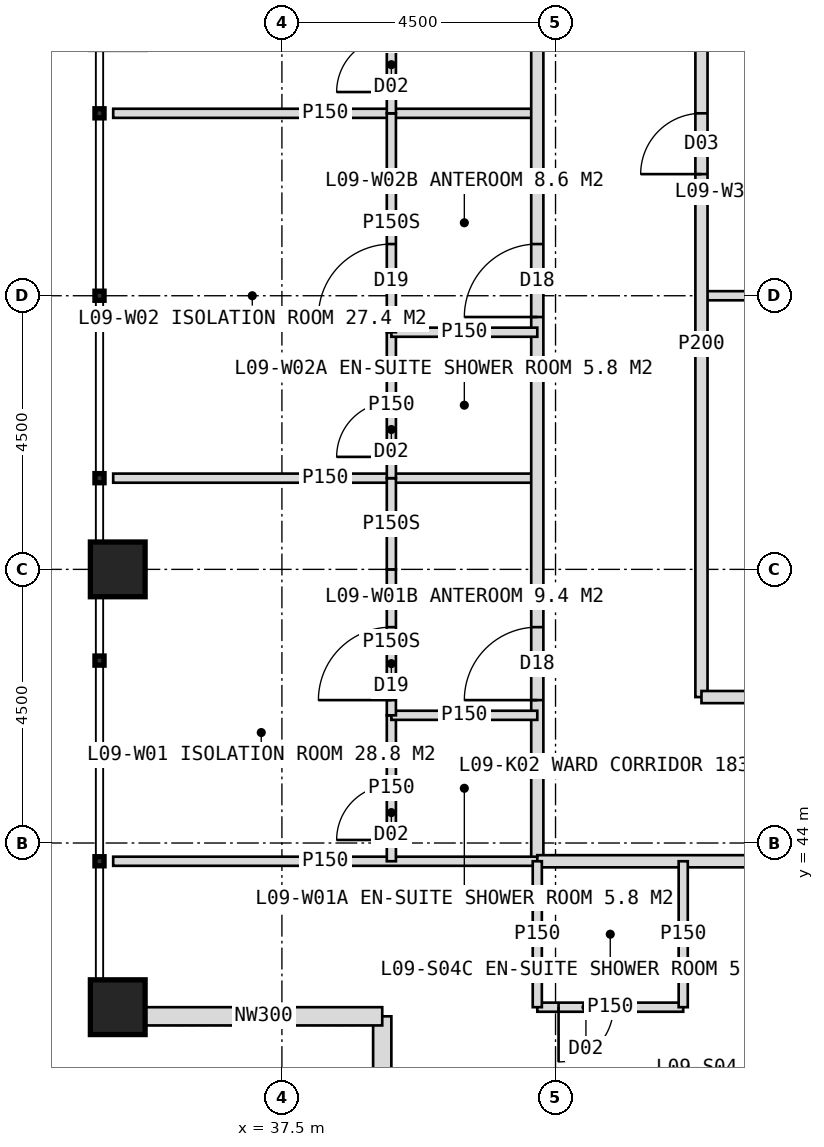
"""IFC4 building model, lengths in metres.
Left out: names, types, materials, properties, quantities, classifications, styles, units other than length and angle.
Written with IfcOpenShell. Run it as: python <this file> out.ifc"""

import sys

from ifc_helpers import new_model, si_unit, direction, frame, frame_2d, origin, origin_2d, place, context, subcontext, project, spatial, rectangle, hollow_rectangle, extrude, element, fill, save


model = new_model("IFC4")
c1 = context("Model", 3, precision=1e-05, world=origin(), true_north=direction((0.0, 1.0)))
c2 = subcontext(c1, "Body", "Model", "MODEL_VIEW")
j1 = project(units=[si_unit("LENGTHUNIT", "METRE"), si_unit("PLANEANGLEUNIT", "RADIAN")], contexts=[c1])
p1 = place(None, origin())
s1 = spatial("IfcSite", under=j1, at=p1, CompositionType="ELEMENT")
p2 = place(p1, origin())
s2 = spatial("IfcBuilding", under=s1, at=p2, CompositionType="ELEMENT")
p3 = place(p2, frame((0.0, 0.0, 43.0)))
s3 = spatial("IfcBuildingStorey", under=s2, at=p3, CompositionType="ELEMENT", Elevation=43.0)
for number, where, z_axis, x_axis in (
    (1, (34.8, 41.3, 0.0), (0.0, 0.0, 1.0), (1.0, 0.0, 0.0)),
    (2, (34.8, 48.5, 0.0), (0.0, 0.0, 1.0), (1.0, 0.0, 0.0)),
):
    element("IfcColumn", number, at=place(p3, frame(where, z_axis=z_axis, x_axis=x_axis)), inside=s3, PredefinedType="COLUMN", context=c2, shape_type="SweptSolid", body=[
        extrude(hollow_rectangle(XDim=0.9, YDim=0.9, WallThickness=0.08, at=origin_2d()), origin(), (0.0, 0.0, 1.0), 4.0),
    ])
for number, where, z_axis, x_axis in (
    (3, (39.15, 37.25, 0.0), (0.0, 0.0, 1.0), (0.0, 1.0, 0.0)),
    (4, (39.15, 41.15, 0.0), (0.0, 0.0, 1.0), (-1.0, 0.0, 0.0)),
):
    element("IfcWall", number, at=place(p3, frame(where, z_axis=z_axis, x_axis=x_axis)), inside=s3, PredefinedType="ELEMENTEDWALL", context=c2, shape_type="SweptSolid", body=[
        extrude(rectangle(XDim=3.9, YDim=0.3, at=frame_2d((1.95, 0.0))), origin(), (0.0, 0.0, 1.0), 2.95),
    ])
for number, where, z_axis, x_axis in (
    (5, (41.7, 50.0, 0.0), (0.0, 0.0, 1.0), (-1.0, 0.0, 0.0)),
    (6, (41.7, 56.0, 0.0), (0.0, 0.0, 1.0), (-1.0, 0.0, 0.0)),
):
    element("IfcWall", number, at=place(p3, frame(where, z_axis=z_axis, x_axis=x_axis)), inside=s3, PredefinedType="PARTITIONING", context=c2, shape_type="SweptSolid", body=[
        extrude(rectangle(XDim=6.975, YDim=0.15, at=frame_2d((3.487, 0.0))), origin(), (0.0, 0.0, 1.0), 3.75),
    ])
p4 = place(p3, frame((41.7, 43.7, 0.0), z_axis=(0.0, 0.0, 1.0), x_axis=(0.0, 1.0, 0.0)))
e7 = element("IfcWall", 7, at=p4, inside=s3, PredefinedType="PARTITIONING", context=c2, shape_type="SweptSolid", body=[
    extrude(rectangle(XDim=36.6, YDim=0.2, at=frame_2d((18.3, 0.0))), origin(), (0.0, 0.0, 1.0), 3.75),
])
p5 = place(p4, frame((2.65, 0.0, 0.0)))
e8 = element("IfcOpeningElement", 8, at=p5, cuts=e7, PredefinedType="OPENING", context=c2, shape_type="SweptSolid", body=[
    extrude(rectangle(XDim=1.2, YDim=2.2, at=frame_2d((0.6, 1.1))), frame((0.0, 0.11, 0.0), z_axis=(0.0, -1.0, 0.0), x_axis=(1.0, 0.0, 0.0)), (0.0, 0.0, 1.0), 0.22),
])
p6 = place(p4, frame((8.95, 0.0, 0.0)))
e9 = element("IfcOpeningElement", 9, at=p6, cuts=e7, PredefinedType="OPENING", context=c2, shape_type="SweptSolid", body=[
    extrude(rectangle(XDim=1.2, YDim=2.2, at=frame_2d((0.6, 1.1))), frame((0.0, 0.11, 0.0), z_axis=(0.0, -1.0, 0.0), x_axis=(1.0, 0.0, 0.0)), (0.0, 0.0, 1.0), 0.22),
])
p7 = place(p4, frame((14.95, 0.0, 0.0)))
e10 = element("IfcOpeningElement", 10, at=p7, cuts=e7, PredefinedType="OPENING", context=c2, shape_type="SweptSolid", body=[
    extrude(rectangle(XDim=1.2, YDim=2.2, at=frame_2d((0.6, 1.1))), frame((0.0, 0.11, 0.0), z_axis=(0.0, -1.0, 0.0), x_axis=(1.0, 0.0, 0.0)), (0.0, 0.0, 1.0), 0.22),
])
p8 = place(p4, frame((20.95, 0.0, 0.0)))
e11 = element("IfcOpeningElement", 11, at=p8, cuts=e7, PredefinedType="OPENING", context=c2, shape_type="SweptSolid", body=[
    extrude(rectangle(XDim=1.2, YDim=2.2, at=frame_2d((0.6, 1.1))), frame((0.0, 0.11, 0.0), z_axis=(0.0, -1.0, 0.0), x_axis=(1.0, 0.0, 0.0)), (0.0, 0.0, 1.0), 0.22),
])
p9 = place(p4, frame((29.95, 0.0, 0.0)))
e12 = element("IfcOpeningElement", 12, at=p9, cuts=e7, PredefinedType="OPENING", context=c2, shape_type="SweptSolid", body=[
    extrude(rectangle(XDim=1.2, YDim=2.2, at=frame_2d((0.6, 1.1))), frame((0.0, 0.11, 0.0), z_axis=(0.0, -1.0, 0.0), x_axis=(1.0, 0.0, 0.0)), (0.0, 0.0, 1.0), 0.22),
])
p10 = place(p3, frame((41.7, 43.7, 0.0), z_axis=(0.0, 0.0, 1.0), x_axis=(-1.0, 0.0, 0.0)))
e13 = element("IfcWall", 13, at=p10, inside=s3, PredefinedType="PARTITIONING", context=c2, shape_type="SweptSolid", body=[
    extrude(rectangle(XDim=6.975, YDim=0.15, at=frame_2d((3.487, 0.0))), origin(), (0.0, 0.0, 1.0), 3.75),
])
p11 = place(p3, frame((39.3, 43.7, 0.0), z_axis=(0.0, 0.0, 1.0), x_axis=(0.0, 1.0, 0.0)))
e14 = element("IfcWall", 14, at=p11, inside=s3, PredefinedType="PARTITIONING", context=c2, shape_type="SweptSolid", body=[
    extrude(rectangle(XDim=2.4, YDim=0.15, at=frame_2d((1.2, 0.0))), origin(), (0.0, 0.0, 1.0), 2.95),
])
p12 = place(p11, frame((0.35, 0.0, 0.0)))
e15 = element("IfcOpeningElement", 15, at=p12, cuts=e14, PredefinedType="OPENING", context=c2, shape_type="SweptSolid", body=[
    extrude(rectangle(XDim=0.9, YDim=2.1, at=frame_2d((0.45, 1.05))), frame((0.0, 0.085, 0.0), z_axis=(0.0, -1.0, 0.0), x_axis=(1.0, 0.0, 0.0)), (0.0, 0.0, 1.0), 0.17),
])
p13 = place(p3, frame((41.7, 46.1, 0.0), z_axis=(0.0, 0.0, 1.0), x_axis=(-1.0, 0.0, 0.0)))
e16 = element("IfcWall", 16, at=p13, inside=s3, PredefinedType="PARTITIONING", context=c2, shape_type="SweptSolid", body=[
    extrude(rectangle(XDim=2.4, YDim=0.15, at=frame_2d((1.2, 0.0))), origin(), (0.0, 0.0, 1.0), 3.75),
])
p14 = place(p3, frame((39.3, 46.1, 0.0), z_axis=(0.0, 0.0, 1.0), x_axis=(0.0, 1.0, 0.0)))
e17 = element("IfcWall", 17, at=p14, inside=s3, PredefinedType="PARTITIONING", context=c2, shape_type="SweptSolid", body=[
    extrude(rectangle(XDim=2.4, YDim=0.15, at=frame_2d((1.2, 0.0))), origin(), (0.0, 0.0, 1.0), 2.95),
])
p15 = place(p14, frame((0.25, 0.0, 0.0)))
e18 = element("IfcOpeningElement", 18, at=p15, cuts=e17, PredefinedType="OPENING", context=c2, shape_type="SweptSolid", body=[
    extrude(rectangle(XDim=1.2, YDim=2.2, at=frame_2d((0.6, 1.1))), frame((0.0, 0.085, 0.0), z_axis=(0.0, -1.0, 0.0), x_axis=(1.0, 0.0, 0.0)), (0.0, 0.0, 1.0), 0.17),
])
p16 = place(p3, frame((39.3, 48.5, 0.0), z_axis=(0.0, 0.0, 1.0), x_axis=(0.0, 1.0, 0.0)))
e19 = element("IfcWall", 19, at=p16, inside=s3, PredefinedType="PARTITIONING", context=c2, shape_type="SweptSolid", body=[
    extrude(rectangle(XDim=1.5, YDim=0.15, at=frame_2d((0.75, 0.0))), origin(), (0.0, 0.0, 1.0), 3.75),
])
p17 = place(p3, frame((39.3, 50.0, 0.0), z_axis=(0.0, 0.0, 1.0), x_axis=(0.0, 1.0, 0.0)))
e20 = element("IfcWall", 20, at=p17, inside=s3, PredefinedType="PARTITIONING", context=c2, shape_type="SweptSolid", body=[
    extrude(rectangle(XDim=2.4, YDim=0.15, at=frame_2d((1.2, 0.0))), origin(), (0.0, 0.0, 1.0), 3.75),
])
p18 = place(p17, frame((0.35, 0.0, 0.0)))
e21 = element("IfcOpeningElement", 21, at=p18, cuts=e20, PredefinedType="OPENING", context=c2, shape_type="SweptSolid", body=[
    extrude(rectangle(XDim=0.9, YDim=2.1, at=frame_2d((0.45, 1.05))), frame((0.0, 0.085, 0.0), z_axis=(0.0, -1.0, 0.0), x_axis=(1.0, 0.0, 0.0)), (0.0, 0.0, 1.0), 0.17),
])
p19 = place(p3, frame((41.7, 52.4, 0.0), z_axis=(0.0, 0.0, 1.0), x_axis=(-1.0, 0.0, 0.0)))
e22 = element("IfcWall", 22, at=p19, inside=s3, PredefinedType="PARTITIONING", context=c2, shape_type="SweptSolid", body=[
    extrude(rectangle(XDim=2.4, YDim=0.15, at=frame_2d((1.2, 0.0))), origin(), (0.0, 0.0, 1.0), 3.75),
])
p20 = place(p3, frame((39.3, 52.4, 0.0), z_axis=(0.0, 0.0, 1.0), x_axis=(0.0, 1.0, 0.0)))
e23 = element("IfcWall", 23, at=p20, inside=s3, PredefinedType="PARTITIONING", context=c2, shape_type="SweptSolid", body=[
    extrude(rectangle(XDim=3.6, YDim=0.15, at=frame_2d((1.8, 0.0))), origin(), (0.0, 0.0, 1.0), 3.75),
])
p21 = place(p20, frame((0.25, 0.0, 0.0)))
e24 = element("IfcOpeningElement", 24, at=p21, cuts=e23, PredefinedType="OPENING", context=c2, shape_type="SweptSolid", body=[
    extrude(rectangle(XDim=1.2, YDim=2.2, at=frame_2d((0.6, 1.1))), frame((0.0, 0.085, 0.0), z_axis=(0.0, -1.0, 0.0), x_axis=(1.0, 0.0, 0.0)), (0.0, 0.0, 1.0), 0.17),
])
p22 = place(p3, frame((39.3, 56.0, 0.0), z_axis=(0.0, 0.0, 1.0), x_axis=(0.0, 1.0, 0.0)))
e25 = element("IfcWall", 25, at=p22, inside=s3, PredefinedType="PARTITIONING", context=c2, shape_type="SweptSolid", body=[
    extrude(rectangle(XDim=2.4, YDim=0.15, at=frame_2d((1.2, 0.0))), origin(), (0.0, 0.0, 1.0), 3.75),
])
p23 = place(p22, frame((0.35, 0.0, 0.0)))
e26 = element("IfcOpeningElement", 26, at=p23, cuts=e25, PredefinedType="OPENING", context=c2, shape_type="SweptSolid", body=[
    extrude(rectangle(XDim=0.9, YDim=2.1, at=frame_2d((0.45, 1.05))), frame((0.0, 0.085, 0.0), z_axis=(0.0, -1.0, 0.0), x_axis=(1.0, 0.0, 0.0)), (0.0, 0.0, 1.0), 0.17),
])
p24 = place(p3, frame((51.0, 53.0, 0.0), z_axis=(0.0, 0.0, 1.0), x_axis=(-1.0, 0.0, 0.0)))
e27 = element("IfcWall", 27, at=p24, inside=s3, PredefinedType="PARTITIONING", context=c2, shape_type="SweptSolid", body=[
    extrude(rectangle(XDim=6.6, YDim=0.15, at=frame_2d((3.3, 0.0))), origin(), (0.0, 0.0, 1.0), 3.75),
])
p25 = place(p3, frame((44.4, 46.4, 0.0), z_axis=(0.0, 0.0, 1.0), x_axis=(0.0, 1.0, 0.0)))
e28 = element("IfcWall", 28, at=p25, inside=s3, PredefinedType="PARTITIONING", context=c2, shape_type="SweptSolid", body=[
    extrude(rectangle(XDim=11.6, YDim=0.2, at=frame_2d((5.8, 0.0))), origin(), (0.0, 0.0, 1.0), 3.75),
])
p26 = place(p25, frame((8.6, 0.0, 0.0)))
e29 = element("IfcOpeningElement", 29, at=p26, cuts=e28, PredefinedType="OPENING", context=c2, shape_type="SweptSolid", body=[
    extrude(rectangle(XDim=1.0, YDim=2.1, at=frame_2d((0.5, 1.05))), frame((0.0, 0.11, 0.0), z_axis=(0.0, -1.0, 0.0), x_axis=(1.0, 0.0, 0.0)), (0.0, 0.0, 1.0), 0.22),
])
p27 = place(p3, frame((78.3, 43.7, 0.0), z_axis=(0.0, 0.0, 1.0), x_axis=(-1.0, 0.0, 0.0)))
e30 = element("IfcWall", 30, at=p27, inside=s3, PredefinedType="PARTITIONING", context=c2, shape_type="SweptSolid", body=[
    extrude(rectangle(XDim=36.6, YDim=0.2, at=frame_2d((18.3, 0.0))), origin(), (0.0, 0.0, 1.0), 3.75),
])
p28 = place(p27, frame((2.65, 0.0, 0.0)))
e31 = element("IfcOpeningElement", 31, at=p28, cuts=e30, PredefinedType="OPENING", context=c2, shape_type="SweptSolid", body=[
    extrude(rectangle(XDim=1.2, YDim=2.2, at=frame_2d((0.6, 1.1))), frame((0.0, 0.11, 0.0), z_axis=(0.0, -1.0, 0.0), x_axis=(1.0, 0.0, 0.0)), (0.0, 0.0, 1.0), 0.22),
])
p29 = place(p27, frame((11.95, 0.0, 0.0)))
e32 = element("IfcOpeningElement", 32, at=p29, cuts=e30, PredefinedType="OPENING", context=c2, shape_type="SweptSolid", body=[
    extrude(rectangle(XDim=1.2, YDim=2.2, at=frame_2d((0.6, 1.1))), frame((0.0, 0.11, 0.0), z_axis=(0.0, -1.0, 0.0), x_axis=(1.0, 0.0, 0.0)), (0.0, 0.0, 1.0), 0.22),
])
p30 = place(p27, frame((20.95, 0.0, 0.0)))
e33 = element("IfcOpeningElement", 33, at=p30, cuts=e30, PredefinedType="OPENING", context=c2, shape_type="SweptSolid", body=[
    extrude(rectangle(XDim=1.2, YDim=2.2, at=frame_2d((0.6, 1.1))), frame((0.0, 0.11, 0.0), z_axis=(0.0, -1.0, 0.0), x_axis=(1.0, 0.0, 0.0)), (0.0, 0.0, 1.0), 0.22),
])
p31 = place(p27, frame((29.95, 0.0, 0.0)))
e34 = element("IfcOpeningElement", 34, at=p31, cuts=e30, PredefinedType="OPENING", context=c2, shape_type="SweptSolid", body=[
    extrude(rectangle(XDim=1.2, YDim=2.2, at=frame_2d((0.6, 1.1))), frame((0.0, 0.11, 0.0), z_axis=(0.0, -1.0, 0.0), x_axis=(1.0, 0.0, 0.0)), (0.0, 0.0, 1.0), 0.22),
])
p32 = place(p3, frame((44.1, 41.3, 0.0), z_axis=(0.0, 0.0, 1.0), x_axis=(-1.0, 0.0, 0.0)))
e35 = element("IfcWall", 35, at=p32, inside=s3, PredefinedType="PARTITIONING", context=c2, shape_type="SweptSolid", body=[
    extrude(rectangle(XDim=2.4, YDim=0.15, at=frame_2d((1.2, 0.0))), origin(), (0.0, 0.0, 1.0), 2.95),
])
p33 = place(p32, frame((1.15, 0.0, 0.0)))
e36 = element("IfcOpeningElement", 36, at=p33, cuts=e35, PredefinedType="OPENING", context=c2, shape_type="SweptSolid", body=[
    extrude(rectangle(XDim=0.9, YDim=2.1, at=frame_2d((0.45, 1.05))), frame((0.0, 0.085, 0.0), z_axis=(0.0, -1.0, 0.0), x_axis=(1.0, 0.0, 0.0)), (0.0, 0.0, 1.0), 0.17),
])
for number, where, z_axis, x_axis in (
    (37, (44.1, 43.7, 0.0), (0.0, 0.0, 1.0), (0.0, -1.0, 0.0)),
    (38, (41.7, 43.7, 0.0), (0.0, 0.0, 1.0), (0.0, -1.0, 0.0)),
):
    element("IfcWall", number, at=place(p3, frame(where, z_axis=z_axis, x_axis=x_axis)), inside=s3, PredefinedType="PARTITIONING", context=c2, shape_type="SweptSolid", body=[
        extrude(rectangle(XDim=2.4, YDim=0.15, at=frame_2d((1.2, 0.0))), origin(), (0.0, 0.0, 1.0), 3.75),
    ])
p34 = place(p3, frame((57.75, 46.4, 0.0), z_axis=(0.0, 0.0, 1.0), x_axis=(-1.0, 0.0, 0.0)))
e39 = element("IfcWall", 39, at=p34, inside=s3, PredefinedType="PARTITIONING", context=c2, shape_type="SweptSolid", body=[
    extrude(rectangle(XDim=13.35, YDim=0.2, at=frame_2d((6.675, 0.0))), origin(), (0.0, 0.0, 1.0), 3.75),
])
p35 = place(p34, frame((2.875, 0.0, 0.0)))
e40 = element("IfcOpeningElement", 40, at=p35, cuts=e39, PredefinedType="OPENING", context=c2, shape_type="SweptSolid", body=[
    extrude(rectangle(XDim=1.0, YDim=2.1, at=frame_2d((0.5, 1.05))), frame((0.0, 0.11, 0.0), z_axis=(0.0, -1.0, 0.0), x_axis=(1.0, 0.0, 0.0)), (0.0, 0.0, 1.0), 0.22),
])
p36 = place(p34, frame((9.55, 0.0, 0.0)))
e41 = element("IfcOpeningElement", 41, at=p36, cuts=e39, PredefinedType="OPENING", context=c2, shape_type="SweptSolid", body=[
    extrude(rectangle(XDim=1.0, YDim=2.1, at=frame_2d((0.5, 1.05))), frame((0.0, 0.11, 0.0), z_axis=(0.0, -1.0, 0.0), x_axis=(1.0, 0.0, 0.0)), (0.0, 0.0, 1.0), 0.22),
])
p37 = place(p15, origin())
e42 = element("IfcDoor", 42, at=p37, inside=s3, OperationType="SINGLE_SWING_LEFT", PredefinedType="DOOR", context=c2, shape_type="SweptSolid", body=[
    extrude(rectangle(XDim=1.2, YDim=2.2, at=frame_2d((0.6, 1.1))), frame((0.0, 0.025, 0.0), z_axis=(0.0, -1.0, 0.0), x_axis=(1.0, 0.0, 0.0)), (0.0, 0.0, 1.0), 0.05),
])
fill(e18, e42)
p38 = place(p5, origin())
e43 = element("IfcDoor", 43, at=p38, inside=s3, OperationType="SINGLE_SWING_LEFT", PredefinedType="DOOR", context=c2, shape_type="SweptSolid", body=[
    extrude(rectangle(XDim=1.2, YDim=2.2, at=frame_2d((0.6, 1.1))), frame((0.0, 0.025, 0.0), z_axis=(0.0, -1.0, 0.0), x_axis=(1.0, 0.0, 0.0)), (0.0, 0.0, 1.0), 0.05),
])
fill(e8, e43)
p39 = place(p12, origin())
e44 = element("IfcDoor", 44, at=p39, inside=s3, OperationType="SINGLE_SWING_LEFT", PredefinedType="DOOR", context=c2, shape_type="SweptSolid", body=[
    extrude(rectangle(XDim=0.9, YDim=2.1, at=frame_2d((0.45, 1.05))), frame((0.0, 0.025, 0.0), z_axis=(0.0, -1.0, 0.0), x_axis=(1.0, 0.0, 0.0)), (0.0, 0.0, 1.0), 0.05),
])
fill(e15, e44)
p40 = place(p21, origin())
e45 = element("IfcDoor", 45, at=p40, inside=s3, OperationType="SINGLE_SWING_LEFT", PredefinedType="DOOR", context=c2, shape_type="SweptSolid", body=[
    extrude(rectangle(XDim=1.2, YDim=2.2, at=frame_2d((0.6, 1.1))), frame((0.0, 0.025, 0.0), z_axis=(0.0, -1.0, 0.0), x_axis=(1.0, 0.0, 0.0)), (0.0, 0.0, 1.0), 0.05),
])
fill(e24, e45)
p41 = place(p6, origin())
e46 = element("IfcDoor", 46, at=p41, inside=s3, OperationType="SINGLE_SWING_LEFT", PredefinedType="DOOR", context=c2, shape_type="SweptSolid", body=[
    extrude(rectangle(XDim=1.2, YDim=2.2, at=frame_2d((0.6, 1.1))), frame((0.0, 0.025, 0.0), z_axis=(0.0, -1.0, 0.0), x_axis=(1.0, 0.0, 0.0)), (0.0, 0.0, 1.0), 0.05),
])
fill(e9, e46)
p42 = place(p18, origin())
e47 = element("IfcDoor", 47, at=p42, inside=s3, OperationType="SINGLE_SWING_LEFT", PredefinedType="DOOR", context=c2, shape_type="SweptSolid", body=[
    extrude(rectangle(XDim=0.9, YDim=2.1, at=frame_2d((0.45, 1.05))), frame((0.0, 0.025, 0.0), z_axis=(0.0, -1.0, 0.0), x_axis=(1.0, 0.0, 0.0)), (0.0, 0.0, 1.0), 0.05),
])
fill(e21, e47)
p43 = place(p23, origin())
e48 = element("IfcDoor", 48, at=p43, inside=s3, OperationType="SINGLE_SWING_LEFT", PredefinedType="DOOR", context=c2, shape_type="SweptSolid", body=[
    extrude(rectangle(XDim=0.9, YDim=2.1, at=frame_2d((0.45, 1.05))), frame((0.0, 0.025, 0.0), z_axis=(0.0, -1.0, 0.0), x_axis=(1.0, 0.0, 0.0)), (0.0, 0.0, 1.0), 0.05),
])
fill(e26, e48)
p44 = place(p26, origin())
e49 = element("IfcDoor", 49, at=p44, inside=s3, OperationType="SINGLE_SWING_LEFT", PredefinedType="DOOR", context=c2, shape_type="SweptSolid", body=[
    extrude(rectangle(XDim=1.0, YDim=2.1, at=frame_2d((0.5, 1.05))), frame((0.0, 0.025, 0.0), z_axis=(0.0, -1.0, 0.0), x_axis=(1.0, 0.0, 0.0)), (0.0, 0.0, 1.0), 0.05),
])
fill(e29, e49)
p45 = place(p33, origin())
e50 = element("IfcDoor", 50, at=p45, inside=s3, OperationType="SINGLE_SWING_RIGHT", PredefinedType="DOOR", context=c2, shape_type="SweptSolid", body=[
    extrude(rectangle(XDim=0.9, YDim=2.1, at=frame_2d((0.45, 1.05))), frame((0.0, 0.025, 0.0), z_axis=(0.0, -1.0, 0.0), x_axis=(1.0, 0.0, 0.0)), (0.0, 0.0, 1.0), 0.05),
])
fill(e36, e50)
save(model, sys.argv[1])
